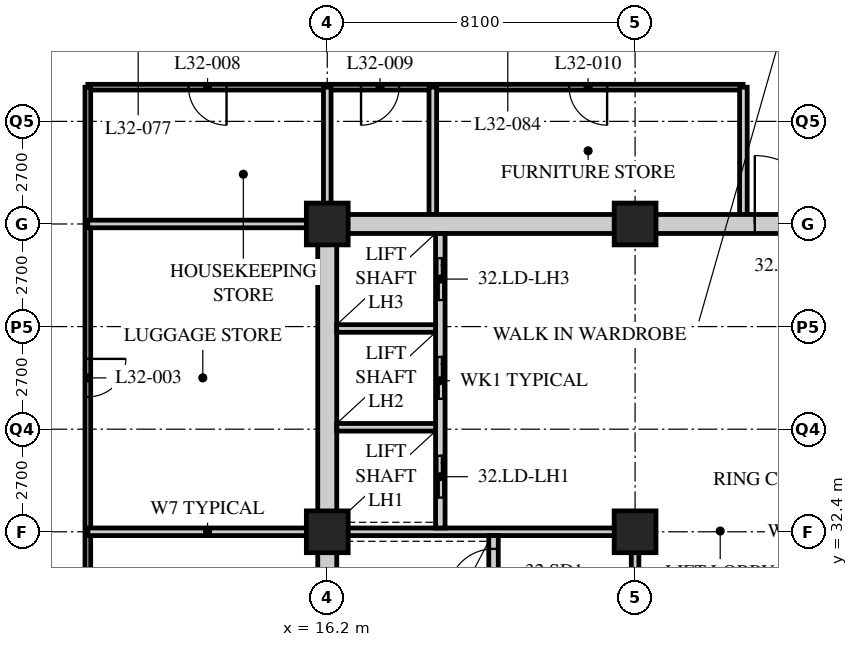
"""IFC4 building model, lengths in metres.
Left out: names, types, materials, properties, quantities, classifications, styles, units other than length and angle.
Written with IfcOpenShell. Run it as: python <this file> out.ifc"""

import sys

from ifc_helpers import new_model, si_unit, direction, frame, frame_2d, origin, origin_2d, place, context, subcontext, project, spatial, rectangle, hollow_rectangle, extrude, element, fill, save


model = new_model("IFC4")
c1 = context("Model", 3, precision=1e-05, world=origin(), true_north=direction((0.0, 1.0)))
c2 = subcontext(c1, "Body", "Model", "MODEL_VIEW")
j1 = project(units=[si_unit("LENGTHUNIT", "METRE"), si_unit("PLANEANGLEUNIT", "RADIAN")], contexts=[c1])
p1 = place(None, origin())
s1 = spatial("IfcSite", under=j1, at=p1, CompositionType="ELEMENT")
p2 = place(p1, origin())
s2 = spatial("IfcBuilding", under=s1, at=p2, CompositionType="ELEMENT")
p3 = place(p2, frame((0.0, 0.0, 127.2)))
s3 = spatial("IfcBuildingStorey", under=s2, at=p3, CompositionType="ELEMENT", Elevation=127.2)
for number, where, z_axis, x_axis in (
    (1, (16.2, 32.4, 0.0), (0.0, 0.0, 1.0), (1.0, 0.0, 0.0)),
    (2, (16.2, 40.5, 0.0), (0.0, 0.0, 1.0), (1.0, 0.0, 0.0)),
    (3, (24.3, 32.4, 0.0), (0.0, 0.0, 1.0), (1.0, 0.0, 0.0)),
    (4, (24.3, 40.5, 0.0), (0.0, 0.0, 1.0), (1.0, 0.0, 0.0)),
):
    element("IfcColumn", number, at=place(p3, frame(where, z_axis=z_axis, x_axis=x_axis)), inside=s3, PredefinedType="COLUMN", context=c2, shape_type="SweptSolid", body=[
        extrude(hollow_rectangle(XDim=1.1, YDim=1.1, WallThickness=0.1, at=origin_2d()), origin(), (0.0, 0.0, 1.0), 3.4),
    ])
p4 = place(p3, frame((27.14, 44.1, 0.0), z_axis=(0.0, 0.0, 1.0), x_axis=(-1.0, 0.0, 0.0)))
e5 = element("IfcWall", 5, at=p4, inside=s3, PredefinedType="PARTITIONING", context=c2, shape_type="SweptSolid", body=[
    extrude(rectangle(XDim=17.24, YDim=0.15, at=frame_2d((8.62, 0.0))), origin(), (0.0, 0.0, 1.0), 3.19),
])
p5 = place(p4, frame((13.59, 0.0, 0.0)))
e6 = element("IfcOpeningElement", 6, at=p5, cuts=e5, PredefinedType="OPENING", context=c2, shape_type="SweptSolid", body=[
    extrude(rectangle(XDim=1.0, YDim=2.1, at=frame_2d((0.5, 1.05))), frame((0.0, 0.085, 0.0), z_axis=(0.0, -1.0, 0.0), x_axis=(1.0, 0.0, 0.0)), (0.0, 0.0, 1.0), 0.17),
])
p6 = place(p4, frame((9.051, 0.0, 0.0)))
e7 = element("IfcOpeningElement", 7, at=p6, cuts=e5, PredefinedType="OPENING", context=c2, shape_type="SweptSolid", body=[
    extrude(rectangle(XDim=1.0, YDim=2.1, at=frame_2d((0.5, 1.05))), frame((0.0, 0.085, 0.0), z_axis=(0.0, -1.0, 0.0), x_axis=(1.0, 0.0, 0.0)), (0.0, 0.0, 1.0), 0.17),
])
p7 = place(p4, frame((3.576, 0.0, 0.0)))
e8 = element("IfcOpeningElement", 8, at=p7, cuts=e5, PredefinedType="OPENING", context=c2, shape_type="SweptSolid", body=[
    extrude(rectangle(XDim=1.0, YDim=2.1, at=frame_2d((0.5, 1.05))), frame((0.0, 0.085, 0.0), z_axis=(0.0, -1.0, 0.0), x_axis=(1.0, 0.0, 0.0)), (0.0, 0.0, 1.0), 0.17),
])
p8 = place(p3, frame((9.9, 44.1, 0.0), z_axis=(0.0, 0.0, 1.0), x_axis=(0.0, -1.0, 0.0)))
e9 = element("IfcWall", 9, at=p8, inside=s3, PredefinedType="PARTITIONING", context=c2, shape_type="SweptSolid", body=[
    extrude(rectangle(XDim=19.8, YDim=0.15, at=frame_2d((9.9, 0.0))), origin(), (0.0, 0.0, 1.0), 3.19),
])
p9 = place(p8, frame((18.5, 0.0, 0.0)))
e10 = element("IfcOpeningElement", 10, at=p9, cuts=e9, PredefinedType="OPENING", context=c2, shape_type="SweptSolid", body=[
    extrude(rectangle(XDim=1.0, YDim=2.1, at=frame_2d((0.5, 1.05))), frame((0.0, 0.085, 0.0), z_axis=(0.0, -1.0, 0.0), x_axis=(1.0, 0.0, 0.0)), (0.0, 0.0, 1.0), 0.17),
])
p10 = place(p8, frame((14.45, 0.0, 0.0)))
e11 = element("IfcOpeningElement", 11, at=p10, cuts=e9, PredefinedType="OPENING", context=c2, shape_type="SweptSolid", body=[
    extrude(rectangle(XDim=1.0, YDim=2.1, at=frame_2d((0.5, 1.05))), frame((0.0, 0.085, 0.0), z_axis=(0.0, -1.0, 0.0), x_axis=(1.0, 0.0, 0.0)), (0.0, 0.0, 1.0), 0.17),
])
p11 = place(p8, frame((7.15, 0.0, 0.0)))
e12 = element("IfcOpeningElement", 12, at=p11, cuts=e9, PredefinedType="OPENING", context=c2, shape_type="SweptSolid", body=[
    extrude(rectangle(XDim=1.0, YDim=2.1, at=frame_2d((0.5, 1.05))), frame((0.0, 0.085, 0.0), z_axis=(0.0, -1.0, 0.0), x_axis=(1.0, 0.0, 0.0)), (0.0, 0.0, 1.0), 0.17),
])
p12 = place(p3, frame((9.9, 32.4, 0.0), z_axis=(0.0, 0.0, 1.0), x_axis=(1.0, 0.0, 0.0)))
e13 = element("IfcWall", 13, at=p12, inside=s3, PredefinedType="SOLIDWALL", context=c2, shape_type="SweptSolid", body=[
    extrude(rectangle(XDim=6.3, YDim=0.2, at=frame_2d((3.15, 0.0))), origin(), (0.0, 0.0, 1.0), 3.19),
])
p13 = place(p3, frame((16.2, 40.5, 0.0), z_axis=(0.0, 0.0, 1.0), x_axis=(0.0, 1.0, 0.0)))
e14 = element("IfcWall", 14, at=p13, inside=s3, PredefinedType="SOLIDWALL", context=c2, shape_type="SweptSolid", body=[
    extrude(rectangle(XDim=3.6, YDim=0.2, at=frame_2d((1.8, 0.0))), origin(), (0.0, 0.0, 1.0), 2.578),
])
for number, where, z_axis, x_axis in (
    (15, (18.978, 44.1, 0.0), (0.0, 0.0, 1.0), (0.0, -1.0, 0.0)),
    (16, (27.15, 40.5, 0.0), (0.0, 0.0, 1.0), (0.0, 1.0, 0.0)),
):
    element("IfcWall", number, at=place(p3, frame(where, z_axis=z_axis, x_axis=x_axis)), inside=s3, PredefinedType="SOLIDWALL", context=c2, shape_type="SweptSolid", body=[
        extrude(rectangle(XDim=3.6, YDim=0.2, at=frame_2d((1.8, 0.0))), origin(), (0.0, 0.0, 1.0), 3.19),
    ])
p14 = place(p3, frame((9.9, 40.5, 0.0), z_axis=(0.0, 0.0, 1.0), x_axis=(1.0, 0.0, 0.0)))
e17 = element("IfcWall", 17, at=p14, inside=s3, PredefinedType="SOLIDWALL", context=c2, shape_type="SweptSolid", body=[
    extrude(rectangle(XDim=6.3, YDim=0.2, at=frame_2d((3.15, 0.0))), origin(), (0.0, 0.0, 1.0), 3.19),
])
p15 = place(p3, frame((15.95, 40.5, 0.0), z_axis=(0.0, 0.0, 1.0), x_axis=(1.0, 0.0, 0.0)))
e18 = element("IfcWall", 18, at=p15, inside=s3, PredefinedType="SOLIDWALL", context=c2, shape_type="SweptSolid", body=[
    extrude(rectangle(XDim=24.8, YDim=0.5, at=frame_2d((12.4, 0.0))), origin(), (0.0, 0.0, 1.0), 2.54),
])
p16 = place(p15, frame((11.5, 0.0, 0.0)))
e19 = element("IfcOpeningElement", 19, at=p16, cuts=e18, PredefinedType="OPENING", context=c2, shape_type="SweptSolid", body=[
    extrude(rectangle(XDim=1.8, YDim=2.4, at=frame_2d((0.9, 1.2))), frame((0.0, 0.26, 0.0), z_axis=(0.0, -1.0, 0.0), x_axis=(1.0, 0.0, 0.0)), (0.0, 0.0, 1.0), 0.52),
])
p17 = place(p3, frame((16.2, 24.55, 0.0), z_axis=(0.0, 0.0, 1.0), x_axis=(0.0, 1.0, 0.0)))
e20 = element("IfcWall", 20, at=p17, inside=s3, PredefinedType="SOLIDWALL", context=c2, shape_type="SweptSolid", body=[
    extrude(rectangle(XDim=15.7, YDim=0.5, at=frame_2d((7.85, 0.0))), origin(), (0.0, 0.0, 1.0), 2.578),
])
p18 = place(p3, frame((16.45, 32.4, 0.0), z_axis=(0.0, 0.0, 1.0), x_axis=(1.0, 0.0, 0.0)))
e21 = element("IfcWall", 21, at=p18, inside=s3, PredefinedType="SOLIDWALL", context=c2, shape_type="SweptSolid", body=[
    extrude(rectangle(XDim=7.95, YDim=0.2, at=frame_2d((3.975, 0.0))), origin(), (0.0, 0.0, 1.0), 2.578),
])
p19 = place(p3, frame((24.3, 24.55, 0.0), z_axis=(0.0, 0.0, 1.0), x_axis=(0.0, 1.0, 0.0)))
e22 = element("IfcWall", 22, at=p19, inside=s3, PredefinedType="SOLIDWALL", context=c2, shape_type="SweptSolid", body=[
    extrude(rectangle(XDim=7.75, YDim=0.2, at=frame_2d((3.875, 0.0))), origin(), (0.0, 0.0, 1.0), 2.578),
])
p20 = place(p19, frame((4.6, 0.0, 0.0)))
e23 = element("IfcOpeningElement", 23, at=p20, cuts=e22, PredefinedType="OPENING", context=c2, shape_type="SweptSolid", body=[
    extrude(rectangle(XDim=1.2, YDim=2.1, at=frame_2d((0.6, 1.05))), frame((0.0, 0.11, 0.0), z_axis=(0.0, -1.0, 0.0), x_axis=(1.0, 0.0, 0.0)), (0.0, 0.0, 1.0), 0.22),
])
p21 = place(p3, frame((20.575, 24.55, 0.0), z_axis=(0.0, 0.0, 1.0), x_axis=(0.0, 1.0, 0.0)))
e24 = element("IfcWall", 24, at=p21, inside=s3, PredefinedType="SOLIDWALL", context=c2, shape_type="SweptSolid", body=[
    extrude(rectangle(XDim=7.75, YDim=0.25, at=frame_2d((3.875, 0.0))), origin(), (0.0, 0.0, 1.0), 3.19),
])
p22 = place(p21, frame((6.2, 0.0, 0.0)))
e25 = element("IfcOpeningElement", 25, at=p22, cuts=e24, PredefinedType="OPENING", context=c2, shape_type="SweptSolid", body=[
    extrude(rectangle(XDim=1.2, YDim=2.1, at=frame_2d((0.6, 1.05))), frame((0.0, 0.135, 0.0), z_axis=(0.0, -1.0, 0.0), x_axis=(1.0, 0.0, 0.0)), (0.0, 0.0, 1.0), 0.27),
])
p23 = place(p3, frame((19.175, 32.5, 0.0), z_axis=(0.0, 0.0, 1.0), x_axis=(0.0, 1.0, 0.0)))
e26 = element("IfcWall", 26, at=p23, inside=s3, PredefinedType="SOLIDWALL", context=c2, shape_type="SweptSolid", body=[
    extrude(rectangle(XDim=7.75, YDim=0.25, at=frame_2d((3.875, 0.0))), origin(), (0.0, 0.0, 1.0), 3.19),
])
p24 = place(p23, frame((0.8, 0.0, 0.0)))
e27 = element("IfcOpeningElement", 27, at=p24, cuts=e26, PredefinedType="OPENING", context=c2, shape_type="SweptSolid", body=[
    extrude(rectangle(XDim=1.1, YDim=2.4, at=frame_2d((0.55, 1.2))), frame((0.0, 0.135, 0.0), z_axis=(0.0, -1.0, 0.0), x_axis=(1.0, 0.0, 0.0)), (0.0, 0.0, 1.0), 0.27),
])
p25 = place(p23, frame((3.4, 0.0, 0.0)))
e28 = element("IfcOpeningElement", 28, at=p25, cuts=e26, PredefinedType="OPENING", context=c2, shape_type="SweptSolid", body=[
    extrude(rectangle(XDim=1.1, YDim=2.4, at=frame_2d((0.55, 1.2))), frame((0.0, 0.135, 0.0), z_axis=(0.0, -1.0, 0.0), x_axis=(1.0, 0.0, 0.0)), (0.0, 0.0, 1.0), 0.27),
])
p26 = place(p23, frame((6.0, 0.0, 0.0)))
e29 = element("IfcOpeningElement", 29, at=p26, cuts=e26, PredefinedType="OPENING", context=c2, shape_type="SweptSolid", body=[
    extrude(rectangle(XDim=1.1, YDim=2.4, at=frame_2d((0.55, 1.2))), frame((0.0, 0.135, 0.0), z_axis=(0.0, -1.0, 0.0), x_axis=(1.0, 0.0, 0.0)), (0.0, 0.0, 1.0), 0.27),
])
for number, where, z_axis, x_axis in (
    (30, (16.45, 35.15, 0.0), (0.0, 0.0, 1.0), (1.0, 0.0, 0.0)),
    (31, (16.45, 37.75, 0.0), (0.0, 0.0, 1.0), (1.0, 0.0, 0.0)),
):
    element("IfcWall", number, at=place(p3, frame(where, z_axis=z_axis, x_axis=x_axis)), inside=s3, PredefinedType="SOLIDWALL", context=c2, shape_type="SweptSolid", body=[
        extrude(rectangle(XDim=2.6, YDim=0.2, at=frame_2d((1.3, 0.0))), origin(), (0.0, 0.0, 1.0), 3.19),
    ])
p27 = place(p11, origin())
e32 = element("IfcDoor", 32, at=p27, inside=s3, OperationType="SINGLE_SWING_LEFT", PredefinedType="DOOR", context=c2, shape_type="SweptSolid", body=[
    extrude(rectangle(XDim=1.0, YDim=2.1, at=frame_2d((0.5, 1.05))), frame((0.0, 0.025, 0.0), z_axis=(0.0, -1.0, 0.0), x_axis=(1.0, 0.0, 0.0)), (0.0, 0.0, 1.0), 0.05),
])
fill(e12, e32)
p28 = place(p5, origin())
e33 = element("IfcDoor", 33, at=p28, inside=s3, OperationType="SINGLE_SWING_LEFT", PredefinedType="DOOR", context=c2, shape_type="SweptSolid", body=[
    extrude(rectangle(XDim=1.0, YDim=2.1, at=frame_2d((0.5, 1.05))), frame((0.0, 0.025, 0.0), z_axis=(0.0, -1.0, 0.0), x_axis=(1.0, 0.0, 0.0)), (0.0, 0.0, 1.0), 0.05),
])
fill(e6, e33)
p29 = place(p6, origin())
e34 = element("IfcDoor", 34, at=p29, inside=s3, OperationType="SINGLE_SWING_RIGHT", PredefinedType="DOOR", context=c2, shape_type="SweptSolid", body=[
    extrude(rectangle(XDim=1.0, YDim=2.1, at=frame_2d((0.5, 1.05))), frame((0.0, 0.025, 0.0), z_axis=(0.0, -1.0, 0.0), x_axis=(1.0, 0.0, 0.0)), (0.0, 0.0, 1.0), 0.05),
])
fill(e7, e34)
p30 = place(p7, origin())
e35 = element("IfcDoor", 35, at=p30, inside=s3, OperationType="SINGLE_SWING_LEFT", PredefinedType="DOOR", context=c2, shape_type="SweptSolid", body=[
    extrude(rectangle(XDim=1.0, YDim=2.1, at=frame_2d((0.5, 1.05))), frame((0.0, 0.025, 0.0), z_axis=(0.0, -1.0, 0.0), x_axis=(1.0, 0.0, 0.0)), (0.0, 0.0, 1.0), 0.05),
])
fill(e8, e35)
p31 = place(p22, origin())
e36 = element("IfcDoor", 36, at=p31, inside=s3, OperationType="SINGLE_SWING_LEFT", PredefinedType="DOOR", context=c2, shape_type="SweptSolid", body=[
    extrude(rectangle(XDim=1.2, YDim=2.1, at=frame_2d((0.6, 1.05))), frame((0.0, 0.025, 0.0), z_axis=(0.0, -1.0, 0.0), x_axis=(1.0, 0.0, 0.0)), (0.0, 0.0, 1.0), 0.05),
])
fill(e25, e36)
p32 = place(p24, origin())
e37 = element("IfcDoor", 37, at=p32, inside=s3, OperationType="DOUBLE_DOOR_SLIDING", PredefinedType="DOOR", context=c2, shape_type="SweptSolid", body=[
    extrude(rectangle(XDim=1.1, YDim=2.4, at=frame_2d((0.55, 1.2))), frame((0.0, 0.025, 0.0), z_axis=(0.0, -1.0, 0.0), x_axis=(1.0, 0.0, 0.0)), (0.0, 0.0, 1.0), 0.05),
])
fill(e27, e37)
p33 = place(p25, origin())
e38 = element("IfcDoor", 38, at=p33, inside=s3, OperationType="DOUBLE_DOOR_SLIDING", PredefinedType="DOOR", context=c2, shape_type="SweptSolid", body=[
    extrude(rectangle(XDim=1.1, YDim=2.4, at=frame_2d((0.55, 1.2))), frame((0.0, 0.025, 0.0), z_axis=(0.0, -1.0, 0.0), x_axis=(1.0, 0.0, 0.0)), (0.0, 0.0, 1.0), 0.05),
])
fill(e28, e38)
p34 = place(p26, origin())
e39 = element("IfcDoor", 39, at=p34, inside=s3, OperationType="DOUBLE_DOOR_SLIDING", PredefinedType="DOOR", context=c2, shape_type="SweptSolid", body=[
    extrude(rectangle(XDim=1.1, YDim=2.4, at=frame_2d((0.55, 1.2))), frame((0.0, 0.025, 0.0), z_axis=(0.0, -1.0, 0.0), x_axis=(1.0, 0.0, 0.0)), (0.0, 0.0, 1.0), 0.05),
])
fill(e29, e39)
p35 = place(p16, origin())
e40 = element("IfcDoor", 40, at=p35, inside=s3, OperationType="DOUBLE_DOOR_SINGLE_SWING", PredefinedType="DOOR", context=c2, shape_type="SweptSolid", body=[
    extrude(rectangle(XDim=1.8, YDim=2.4, at=frame_2d((0.9, 1.2))), frame((0.0, 0.025, 0.0), z_axis=(0.0, -1.0, 0.0), x_axis=(1.0, 0.0, 0.0)), (0.0, 0.0, 1.0), 0.05),
])
fill(e19, e40)
save(model, sys.argv[1])
